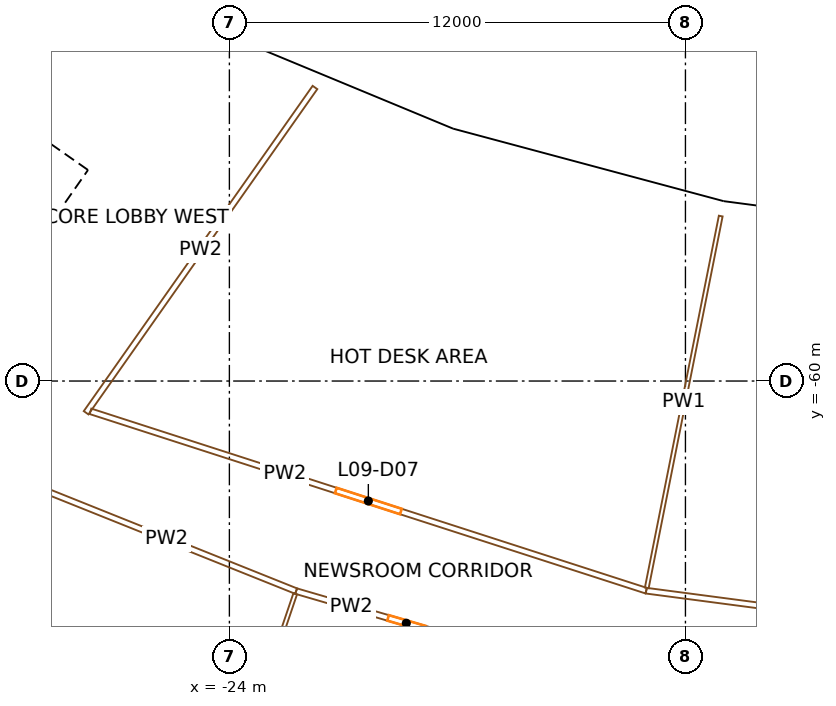
"""IFC4 building model, lengths in metres.
Left out: names, types, materials, properties, quantities, classifications, styles, units other than length and angle.
Written with IfcOpenShell. Run it as: python <this file> out.ifc"""

import sys

from ifc_helpers import new_model, si_unit, direction, frame, frame_2d, origin, origin_2d, place, context, subcontext, project, spatial, rectangle, extrude, element, fill, save


model = new_model("IFC4")
c1 = context("Model", 3, precision=1e-05, world=origin(), true_north=direction((0.0, 1.0)))
c2 = subcontext(c1, "Body", "Model", "MODEL_VIEW")
j1 = project(units=[si_unit("LENGTHUNIT", "METRE"), si_unit("PLANEANGLEUNIT", "RADIAN")], contexts=[c1])
p1 = place(None, origin())
s1 = spatial("IfcSite", under=j1, at=p1, CompositionType="ELEMENT")
p2 = place(p1, origin())
s2 = spatial("IfcBuilding", under=s1, at=p2, CompositionType="ELEMENT")
p3 = place(p2, frame((0.0, 0.0, 51.9)))
s3 = spatial("IfcBuildingStorey", under=s2, at=p3, CompositionType="ELEMENT", Elevation=51.9)
for number, where, z_axis, x_axis in (
    (1, (-25.763, -52.243, 0.0), (0.0, 0.0, 1.0), (0.897, -0.442, 0.0)),
    (2, (-18.724, -55.159, 0.0), (0.0, 0.0, 1.0), (0.947, -0.321, 0.0)),
    (3, (-11.364, -57.131, 0.0), (0.0, 0.0, 1.0), (0.981, -0.195, 0.0)),
):
    element("IfcColumn", number, at=place(p3, frame(where, z_axis=z_axis, x_axis=x_axis)), inside=s3, PredefinedType="COLUMN", context=c2, shape_type="SweptSolid", body=[
        extrude(rectangle(XDim=1.3, YDim=1.7, at=origin_2d()), origin(), (0.0, 0.0, 1.0), 3.8),
    ])
p4 = place(p3, frame((-36.717, -66.337, 0.0), z_axis=(0.0, 0.0, 1.0), x_axis=(0.573577477574, 0.819151315216, 0.0)))
e4 = element("IfcWall", 4, at=p4, inside=s3, PredefinedType="SHEAR", context=c2, shape_type="SweptSolid", body=[
    extrude(rectangle(XDim=14.8, YDim=0.9, at=frame_2d((7.4, 0.0))), origin(), (0.0, 0.0, 1.0), 3.5),
])
p5 = place(p4, frame((6.2, 0.0, 0.0)))
e5 = element("IfcOpeningElement", 5, at=p5, cuts=e4, PredefinedType="OPENING", context=c2, shape_type="SweptSolid", body=[
    extrude(rectangle(XDim=2.4, YDim=2.1, at=frame_2d((1.2, 1.05))), frame((0.0, 0.46, 0.0), z_axis=(0.0, -1.0, 0.0), x_axis=(1.0, 0.0, 0.0)), (0.0, 0.0, 1.0), 0.92),
])
p6 = place(p3, frame((-28.854, -54.324, 0.0), z_axis=(0.0, 0.0, 1.0), x_axis=(-0.819145767589, 0.573585400304, 0.0)))
e6 = element("IfcWall", 6, at=p6, inside=s3, PredefinedType="SHEAR", context=c2, shape_type="SweptSolid", body=[
    extrude(rectangle(XDim=15.045, YDim=0.9, at=frame_2d((7.523, 0.0))), origin(), (0.0, 0.0, 1.0), 3.5),
])
p7 = place(p6, frame((0.9, 0.0, 0.0)))
e7 = element("IfcOpeningElement", 7, at=p7, cuts=e6, PredefinedType="OPENING", context=c2, shape_type="SweptSolid", body=[
    extrude(rectangle(XDim=1.0, YDim=2.1, at=frame_2d((0.5, 1.05))), frame((0.0, 0.46, 0.0), z_axis=(0.0, -1.0, 0.0), x_axis=(1.0, 0.0, 0.0)), (0.0, 0.0, 1.0), 0.92),
])
p8 = place(p6, frame((4.975, 0.0, 0.0)))
e8 = element("IfcOpeningElement", 8, at=p8, cuts=e6, PredefinedType="OPENING", context=c2, shape_type="SweptSolid", body=[
    extrude(rectangle(XDim=0.9, YDim=2.1, at=frame_2d((0.45, 1.05))), frame((0.0, 0.46, 0.0), z_axis=(0.0, -1.0, 0.0), x_axis=(1.0, 0.0, 0.0)), (0.0, 0.0, 1.0), 0.92),
])
p9 = place(p6, frame((13.495, 0.0, 0.0)))
e9 = element("IfcOpeningElement", 9, at=p9, cuts=e6, PredefinedType="OPENING", context=c2, shape_type="SweptSolid", body=[
    extrude(rectangle(XDim=1.1, YDim=2.1, at=frame_2d((0.55, 1.05))), frame((0.0, 0.46, 0.0), z_axis=(0.0, -1.0, 0.0), x_axis=(1.0, 0.0, 0.0)), (0.0, 0.0, 1.0), 0.92),
])
p10 = place(p3, frame((-18.224, -53.53, 0.0), z_axis=(0.0, 0.0, 1.0), x_axis=(-0.923891626322, 0.382654234018, 0.0)))
e10 = element("IfcWall", 10, at=p10, inside=s3, PredefinedType="SOLIDWALL", context=c2, shape_type="SweptSolid", body=[
    extrude(rectangle(XDim=7.296, YDim=0.4, at=frame_2d((3.648, 0.0))), origin(), (0.0, 0.0, 1.0), 2.7),
])
p11 = place(p10, frame((4.191, 0.0, 0.9)))
e11 = element("IfcOpeningElement", 11, at=p11, cuts=e10, PredefinedType="OPENING", context=c2, shape_type="SweptSolid", body=[
    extrude(rectangle(XDim=2.6, YDim=1.65, at=frame_2d((1.3, 0.825))), frame((0.0, 0.21, 0.0), z_axis=(0.0, -1.0, 0.0), x_axis=(1.0, 0.0, 0.0)), (0.0, 0.0, 1.0), 0.42),
])
p12 = place(p10, frame((0.505, 0.0, 0.9)))
e12 = element("IfcOpeningElement", 12, at=p12, cuts=e10, PredefinedType="OPENING", context=c2, shape_type="SweptSolid", body=[
    extrude(rectangle(XDim=2.6, YDim=1.65, at=frame_2d((1.3, 0.825))), frame((0.0, 0.21, 0.0), z_axis=(0.0, -1.0, 0.0), x_axis=(1.0, 0.0, 0.0)), (0.0, 0.0, 1.0), 0.42),
])
p13 = place(p3, frame((-11.008, -55.47, 0.0), z_axis=(0.0, 0.0, 1.0), x_axis=(-0.965924637935, 0.25882348006, 0.0)))
e13 = element("IfcWall", 13, at=p13, inside=s3, PredefinedType="SOLIDWALL", context=c2, shape_type="SweptSolid", body=[
    extrude(rectangle(XDim=7.447, YDim=0.4, at=frame_2d((3.724, 0.0))), origin(), (0.0, 0.0, 1.0), 2.7),
])
p14 = place(p13, frame((4.266, 0.0, 0.9)))
e14 = element("IfcOpeningElement", 14, at=p14, cuts=e13, PredefinedType="OPENING", context=c2, shape_type="SweptSolid", body=[
    extrude(rectangle(XDim=2.6, YDim=1.65, at=frame_2d((1.3, 0.825))), frame((0.0, 0.21, 0.0), z_axis=(0.0, -1.0, 0.0), x_axis=(1.0, 0.0, 0.0)), (0.0, 0.0, 1.0), 0.42),
])
p15 = place(p13, frame((0.581, 0.0, 0.9)))
e15 = element("IfcOpeningElement", 15, at=p15, cuts=e13, PredefinedType="OPENING", context=c2, shape_type="SweptSolid", body=[
    extrude(rectangle(XDim=2.6, YDim=1.65, at=frame_2d((1.3, 0.825))), frame((0.0, 0.21, 0.0), z_axis=(0.0, -1.0, 0.0), x_axis=(1.0, 0.0, 0.0)), (0.0, 0.0, 1.0), 0.42),
])
p16 = place(p3, frame((-3.749, -56.423, 0.0), z_axis=(0.0, 0.0, 1.0), x_axis=(-0.99144746031, 0.130506449818, 0.0)))
e16 = element("IfcWall", 16, at=p16, inside=s3, PredefinedType="SOLIDWALL", context=c2, shape_type="SweptSolid", body=[
    extrude(rectangle(XDim=7.296, YDim=0.4, at=frame_2d((3.648, 0.0))), origin(), (0.0, 0.0, 1.0), 2.7),
])
p17 = place(p16, frame((4.191, 0.0, 0.9)))
e17 = element("IfcOpeningElement", 17, at=p17, cuts=e16, PredefinedType="OPENING", context=c2, shape_type="SweptSolid", body=[
    extrude(rectangle(XDim=2.6, YDim=1.65, at=frame_2d((1.3, 0.825))), frame((0.0, 0.21, 0.0), z_axis=(0.0, -1.0, 0.0), x_axis=(1.0, 0.0, 0.0)), (0.0, 0.0, 1.0), 0.42),
])
p18 = place(p16, frame((0.505, 0.0, 0.9)))
e18 = element("IfcOpeningElement", 18, at=p18, cuts=e16, PredefinedType="OPENING", context=c2, shape_type="SweptSolid", body=[
    extrude(rectangle(XDim=2.6, YDim=1.65, at=frame_2d((1.3, 0.825))), frame((0.0, 0.21, 0.0), z_axis=(0.0, -1.0, 0.0), x_axis=(1.0, 0.0, 0.0)), (0.0, 0.0, 1.0), 0.42),
])
p19 = place(p3, frame((-29.061, -62.798, 0.0), z_axis=(0.0, 0.0, 1.0), x_axis=(0.928339065762, -0.371734554462, 0.0)))
e19 = element("IfcWall", 19, at=p19, inside=s3, PredefinedType="PARTITIONING", context=c2, shape_type="SweptSolid", body=[
    extrude(rectangle(XDim=7.344, YDim=0.15, at=frame_2d((3.672, 0.0))), origin(), (0.0, 0.0, 1.0), 2.4),
])
p20 = place(p3, frame((-27.656, -60.797, 0.0), z_axis=(0.0, 0.0, 1.0), x_axis=(0.951666530015, -0.307133221338, 0.0)))
e20 = element("IfcWall", 20, at=p20, inside=s3, PredefinedType="PARTITIONING", context=c2, shape_type="SweptSolid", body=[
    extrude(rectangle(XDim=15.366, YDim=0.15, at=frame_2d((7.683, 0.0))), origin(), (0.0, 0.0, 1.0), 2.4),
])
p21 = place(p20, frame((6.783, 0.0, 0.0)))
e21 = element("IfcOpeningElement", 21, at=p21, cuts=e20, PredefinedType="OPENING", context=c2, shape_type="SweptSolid", body=[
    extrude(rectangle(XDim=1.8, YDim=2.1, at=frame_2d((0.9, 1.05))), frame((0.0, 0.085, 0.0), z_axis=(0.0, -1.0, 0.0), x_axis=(1.0, 0.0, 0.0)), (0.0, 0.0, 1.0), 0.17),
])
p22 = place(p3, frame((-25.538, -75.234, 0.0), z_axis=(0.0, 0.0, 1.0), x_axis=(0.32142736677, 0.946934236308, 0.0)))
e22 = element("IfcWall", 22, at=p22, inside=s3, PredefinedType="PARTITIONING", context=c2, shape_type="SweptSolid", body=[
    extrude(rectangle(XDim=10.175, YDim=0.1, at=frame_2d((5.087, 0.0))), origin(), (0.0, 0.0, 1.0), 2.4),
])
p23 = place(p3, frame((-16.446, -67.217, 0.0), z_axis=(0.0, 0.0, 1.0), x_axis=(-0.960056580345, 0.279805937279, 0.0)))
e23 = element("IfcWall", 23, at=p23, inside=s3, PredefinedType="PARTITIONING", context=c2, shape_type="SweptSolid", body=[
    extrude(rectangle(XDim=6.039, YDim=0.15, at=frame_2d((3.02, 0.0))), origin(), (0.0, 0.0, 1.0), 2.4),
])
p24 = place(p23, frame((2.52, 0.0, 0.0)))
e24 = element("IfcOpeningElement", 24, at=p24, cuts=e23, PredefinedType="OPENING", context=c2, shape_type="SweptSolid", body=[
    extrude(rectangle(XDim=1.0, YDim=2.1, at=frame_2d((0.5, 1.05))), frame((0.0, 0.085, 0.0), z_axis=(0.0, -1.0, 0.0), x_axis=(1.0, 0.0, 0.0)), (0.0, 0.0, 1.0), 0.17),
])
p25 = place(p3, frame((-21.748, -52.276, 0.0), z_axis=(0.0, 0.0, 1.0), x_axis=(-0.575419434668, -0.817858468322, 0.0)))
e25 = element("IfcWall", 25, at=p25, inside=s3, PredefinedType="PARTITIONING", context=c2, shape_type="SweptSolid", body=[
    extrude(rectangle(XDim=10.465, YDim=0.15, at=frame_2d((5.232, 0.0))), origin(), (0.0, 0.0, 1.0), 2.4),
])
p26 = place(p3, frame((-13.032, -65.516, 0.0), z_axis=(0.0, 0.0, 1.0), x_axis=(0.991443260322, -0.130538352841, 0.0)))
e26 = element("IfcWall", 26, at=p26, inside=s3, PredefinedType="PARTITIONING", context=c2, shape_type="SweptSolid", body=[
    extrude(rectangle(XDim=8.738, YDim=0.15, at=frame_2d((4.369, 0.0))), origin(), (0.0, 0.0, 1.0), 2.4),
])
p27 = place(p26, frame((3.869, 0.0, 0.0)))
e27 = element("IfcOpeningElement", 27, at=p27, cuts=e26, PredefinedType="OPENING", context=c2, shape_type="SweptSolid", body=[
    extrude(rectangle(XDim=1.0, YDim=2.1, at=frame_2d((0.5, 1.05))), frame((0.0, 0.085, 0.0), z_axis=(0.0, -1.0, 0.0), x_axis=(1.0, 0.0, 0.0)), (0.0, 0.0, 1.0), 0.17),
])
p28 = place(p3, frame((-11.071, -55.66, 0.0), z_axis=(0.0, 0.0, 1.0), x_axis=(-0.195094645032, -0.980784420492, 0.0)))
e28 = element("IfcWall", 28, at=p28, inside=s3, PredefinedType="PARTITIONING", context=c2, shape_type="SweptSolid", body=[
    extrude(rectangle(XDim=9.975, YDim=0.1, at=frame_2d((4.987, 0.0))), origin(), (0.0, 0.0, 1.0), 2.4),
])
p29 = place(p11, origin())
e29 = element("IfcWindow", 29, at=p29, inside=s3, PartitioningType="SINGLE_PANEL", PredefinedType="WINDOW", context=c2, shape_type="SweptSolid", body=[
    extrude(rectangle(XDim=2.6, YDim=1.65, at=frame_2d((1.3, 0.825))), frame((0.0, 0.03, 0.0), z_axis=(0.0, -1.0, 0.0), x_axis=(1.0, 0.0, 0.0)), (0.0, 0.0, 1.0), 0.06),
])
fill(e11, e29)
p30 = place(p12, origin())
e30 = element("IfcWindow", 30, at=p30, inside=s3, PartitioningType="SINGLE_PANEL", PredefinedType="WINDOW", context=c2, shape_type="SweptSolid", body=[
    extrude(rectangle(XDim=2.6, YDim=1.65, at=frame_2d((1.3, 0.825))), frame((0.0, 0.03, 0.0), z_axis=(0.0, -1.0, 0.0), x_axis=(1.0, 0.0, 0.0)), (0.0, 0.0, 1.0), 0.06),
])
fill(e12, e30)
p31 = place(p14, origin())
e31 = element("IfcWindow", 31, at=p31, inside=s3, PartitioningType="SINGLE_PANEL", PredefinedType="WINDOW", context=c2, shape_type="SweptSolid", body=[
    extrude(rectangle(XDim=2.6, YDim=1.65, at=frame_2d((1.3, 0.825))), frame((0.0, 0.03, 0.0), z_axis=(0.0, -1.0, 0.0), x_axis=(1.0, 0.0, 0.0)), (0.0, 0.0, 1.0), 0.06),
])
fill(e14, e31)
p32 = place(p15, origin())
e32 = element("IfcWindow", 32, at=p32, inside=s3, PartitioningType="SINGLE_PANEL", PredefinedType="WINDOW", context=c2, shape_type="SweptSolid", body=[
    extrude(rectangle(XDim=2.6, YDim=1.65, at=frame_2d((1.3, 0.825))), frame((0.0, 0.03, 0.0), z_axis=(0.0, -1.0, 0.0), x_axis=(1.0, 0.0, 0.0)), (0.0, 0.0, 1.0), 0.06),
])
fill(e15, e32)
p33 = place(p17, origin())
e33 = element("IfcWindow", 33, at=p33, inside=s3, PartitioningType="SINGLE_PANEL", PredefinedType="WINDOW", context=c2, shape_type="SweptSolid", body=[
    extrude(rectangle(XDim=2.6, YDim=1.65, at=frame_2d((1.3, 0.825))), frame((0.0, 0.03, 0.0), z_axis=(0.0, -1.0, 0.0), x_axis=(1.0, 0.0, 0.0)), (0.0, 0.0, 1.0), 0.06),
])
fill(e17, e33)
p34 = place(p24, origin())
e34 = element("IfcDoor", 34, at=p34, inside=s3, OperationType="SINGLE_SWING_RIGHT", PredefinedType="DOOR", context=c2, shape_type="SweptSolid", body=[
    extrude(rectangle(XDim=1.0, YDim=2.1, at=frame_2d((0.5, 1.05))), frame((0.0, 0.025, 0.0), z_axis=(0.0, -1.0, 0.0), x_axis=(1.0, 0.0, 0.0)), (0.0, 0.0, 1.0), 0.05),
])
fill(e24, e34)
p35 = place(p21, origin())
e35 = element("IfcDoor", 35, at=p35, inside=s3, OperationType="DOUBLE_DOOR_SINGLE_SWING", PredefinedType="DOOR", context=c2, shape_type="SweptSolid", body=[
    extrude(rectangle(XDim=1.8, YDim=2.1, at=frame_2d((0.9, 1.05))), frame((0.0, 0.025, 0.0), z_axis=(0.0, -1.0, 0.0), x_axis=(1.0, 0.0, 0.0)), (0.0, 0.0, 1.0), 0.05),
])
fill(e21, e35)
save(model, sys.argv[1])
